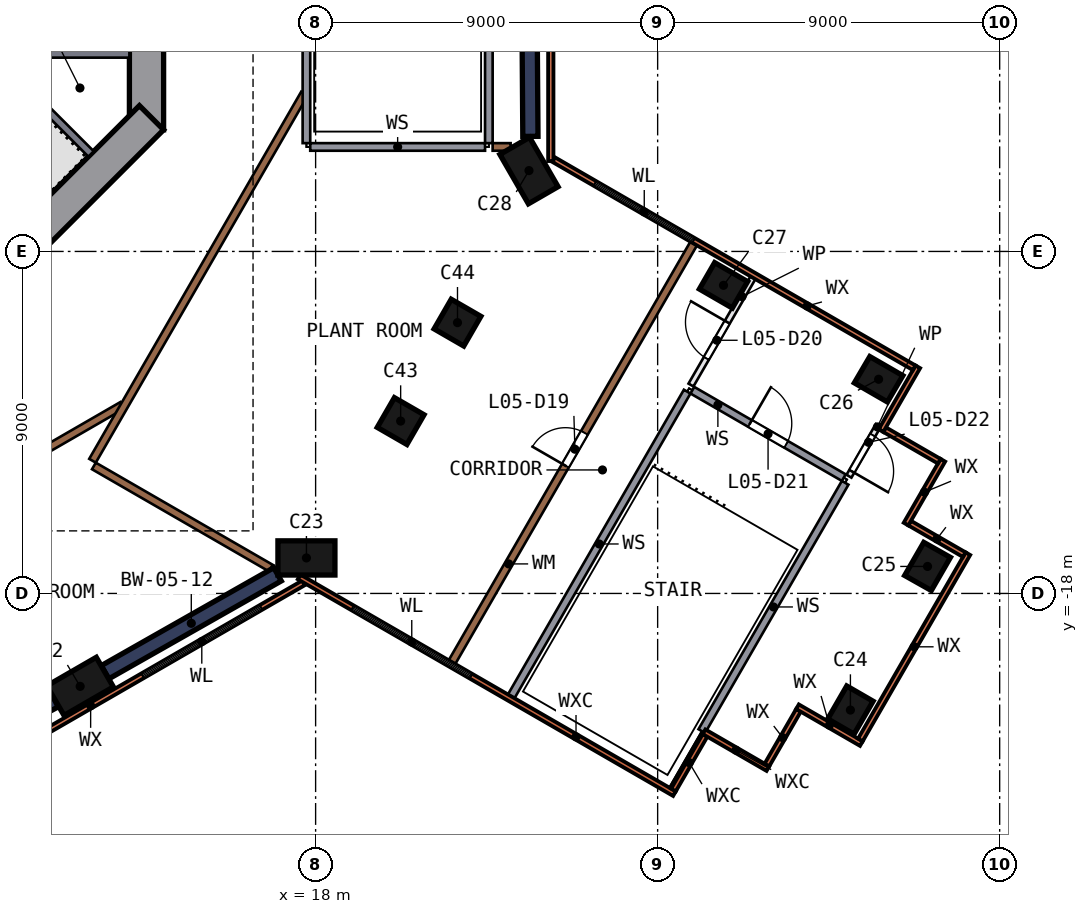
"""IFC4 building model, lengths in metres.
Left out: names, types, materials, properties, quantities, classifications, styles, units other than length and angle.
Written with IfcOpenShell. Run it as: python <this file> out.ifc"""

import sys

from ifc_helpers import new_model, si_unit, direction, frame, frame_2d, origin, origin_2d, place, context, subcontext, project, spatial, polyline, rectangle, outline, extrude, element, fill, save


model = new_model("IFC4")
c1 = context("Model", 3, precision=1e-05, world=origin(), true_north=direction((0.0, 1.0)))
c2 = subcontext(c1, "Body", "Model", "MODEL_VIEW")
j1 = project(units=[si_unit("LENGTHUNIT", "METRE"), si_unit("PLANEANGLEUNIT", "RADIAN")], contexts=[c1])
p1 = place(None, origin())
s1 = spatial("IfcSite", under=j1, at=p1, CompositionType="ELEMENT")
p2 = place(p1, origin())
s2 = spatial("IfcBuilding", under=s1, at=p2, CompositionType="ELEMENT")
p3 = place(p2, frame((0.0, 0.0, 28.0)))
s3 = spatial("IfcBuildingStorey", under=s2, at=p3, CompositionType="ELEMENT", Elevation=28.0)
for number, where, z_axis, x_axis in (
    (1, (11.804, -20.445, 0.0), (0.0, 0.0, 1.0), (0.866, 0.5, 0.0)),
    (2, (17.758, -17.065, 0.0), (0.0, 0.0, 1.0), (-1.0, 0.0, 0.0)),
):
    element("IfcColumn", number, at=place(p3, frame(where, z_axis=z_axis, x_axis=x_axis)), inside=s3, PredefinedType="COLUMN", context=c2, shape_type="SweptSolid", body=[
        extrude(rectangle(XDim=1.5, YDim=0.9, at=origin_2d()), origin(), (0.0, 0.0, 1.0), 4.5),
    ])
p4 = place(p3, frame((32.069, -21.055, 0.0), z_axis=(0.003037985, -0.011338195, 0.999931106), x_axis=(0.500048177, 0.865957813, 0.008299831)))
e3 = element("IfcColumn", 3, at=p4, inside=s3, PredefinedType="COLUMN", context=c2, shape_type="SweptSolid", body=[
    extrude(rectangle(XDim=1.0, YDim=0.8, at=origin_2d()), origin(), (0.0, 0.0, 1.0), 4.5),
])
p5 = place(p3, frame((34.269, -17.245, 0.0), z_axis=(-0.137474992, -0.036839002, 0.98981994), x_axis=(0.488630007, 0.866727232, 0.100123031)))
e4 = element("IfcColumn", 4, at=p5, inside=s3, PredefinedType="COLUMN", context=c2, shape_type="SweptSolid", body=[
    extrude(rectangle(XDim=1.0, YDim=0.8, at=origin_2d()), origin(), (0.0, 0.0, 1.0), 4.546),
])
p6 = place(p3, frame((32.951, -12.327, 0.0), z_axis=(-0.113094861, -0.030280758, 0.993122665), x_axis=(-0.859519435, 0.504400563, -0.082500986)))
e5 = element("IfcColumn", 5, at=p6, inside=s3, PredefinedType="COLUMN", context=c2, shape_type="SweptSolid", body=[
    extrude(rectangle(XDim=1.0, YDim=0.8, at=origin_2d()), origin(), (0.0, 0.0, 1.0), 4.531),
])
p7 = place(p3, frame((28.783, -9.805, 0.0), z_axis=(-0.041522613, -0.071961716, 0.996542716), x_axis=(-0.866153083, 0.499778788, 0.0)))
e6 = element("IfcColumn", 6, at=p7, inside=s3, PredefinedType="COLUMN", context=c2, shape_type="SweptSolid", body=[
    extrude(rectangle(XDim=1.0, YDim=0.8, at=origin_2d()), origin(), (0.0, 0.0, 1.0), 4.516),
])
p8 = place(p3, frame((23.658, -6.846, 0.0), z_axis=(-0.036588384, -0.021139955, 0.999106797), x_axis=(0.500277598, -0.865865073, 0.0)))
e7 = element("IfcColumn", 7, at=p8, inside=s3, PredefinedType="COLUMN", context=c2, shape_type="SweptSolid", body=[
    extrude(rectangle(XDim=1.5, YDim=0.9, at=origin_2d()), origin(), (0.0, 0.0, 1.0), 4.504),
])
p9 = place(p3, frame((20.283, -13.385, 0.0), z_axis=(-0.037868143, -0.06567418, 0.997122312), x_axis=(0.866304362, -0.499516518, 0.0)))
e8 = element("IfcColumn", 8, at=p9, inside=s3, PredefinedType="COLUMN", context=c2, shape_type="SweptSolid", body=[
    extrude(rectangle(XDim=0.9, YDim=0.9, at=origin_2d()), origin(), (0.0, 0.0, 1.0), 4.513),
])
p10 = place(p3, frame((21.733, -10.873, 0.0), z_axis=(0.0, 0.0, 1.0), x_axis=(0.866025404, -0.5, 0.0)))
e9 = element("IfcColumn", 9, at=p10, inside=s3, PredefinedType="COLUMN", context=c2, shape_type="SweptSolid", body=[
    extrude(rectangle(XDim=0.9, YDim=0.9, at=origin_2d()), origin(), (0.0, 0.0, 1.0), 4.5),
])
p11 = place(p3, frame((13.55, -5.799, 0.0), z_axis=(0.0, 0.0, 1.0), x_axis=(0.0, 1.0, 0.0)))
e10 = element("IfcWall", 10, at=p11, inside=s3, PredefinedType="SHEAR", context=c2, shape_type="SweptSolid", body=[
    extrude(rectangle(XDim=11.598, YDim=0.9, at=frame_2d((5.799, 0.0))), origin(), (0.0, 0.0, 1.0), 6.0),
])
p12 = place(p11, frame((4.899, 0.0, 0.0)))
e11 = element("IfcOpeningElement", 11, at=p12, cuts=e10, PredefinedType="OPENING", context=c2, shape_type="SweptSolid", body=[
    extrude(rectangle(XDim=1.8, YDim=2.1, at=frame_2d((0.9, 1.05))), frame((0.0, 0.46, 0.0), z_axis=(0.0, -1.0, 0.0), x_axis=(1.0, 0.0, 0.0)), (0.0, 0.0, 1.0), 0.92),
])
p13 = place(p3, frame((5.481, -13.682, 0.0), z_axis=(0.0, 0.0, 1.0), x_axis=(0.707106781, 0.707106781, 0.0)))
e12 = element("IfcWall", 12, at=p13, inside=s3, PredefinedType="SHEAR", context=c2, shape_type="SweptSolid", body=[
    extrude(rectangle(XDim=11.598, YDim=0.9, at=frame_2d((5.799, 0.0))), origin(), (0.0, 0.0, 1.0), 6.0),
])
p14 = place(p13, frame((2.099, 0.0, 0.0)))
e13 = element("IfcOpeningElement", 13, at=p14, cuts=e12, PredefinedType="OPENING", context=c2, shape_type="SweptSolid", body=[
    extrude(rectangle(XDim=1.2, YDim=2.1, at=frame_2d((0.6, 1.05))), frame((0.0, 0.46, 0.0), z_axis=(0.0, -1.0, 0.0), x_axis=(1.0, 0.0, 0.0)), (0.0, 0.0, 1.0), 0.92),
])
p15 = place(p3, frame((7.011, -23.032, 0.0), z_axis=(0.0, 0.0, 1.0), x_axis=(0.879988629, 0.474994751, 0.0)))
e14 = element("IfcWall", 14, at=p15, inside=s3, PredefinedType="SHEAR", context=c2, shape_type="SweptSolid", body=[
    extrude(rectangle(XDim=4.684, YDim=0.4, at=frame_2d((2.342, 0.0))), origin(), (0.0, 0.0, 1.0), 4.5),
])
p16 = place(p3, frame((12.459, -20.073, 0.0), z_axis=(0.0, 0.0, 1.0), x_axis=(0.869667461, 0.493638034, 0.0)))
e15 = element("IfcWall", 15, at=p16, inside=s3, PredefinedType="SHEAR", context=c2, shape_type="SweptSolid", body=[
    extrude(rectangle(XDim=5.219, YDim=0.4, at=frame_2d((2.609, 0.0))), origin(), (0.0, 0.0, 1.0), 4.5),
])
p17 = place(p3, frame((23.652, -5.972, 0.0), z_axis=(0.0, 0.0, 1.0), x_axis=(-0.00729771, 0.999973371, 0.0)))
e16 = element("IfcWall", 16, at=p17, inside=s3, PredefinedType="SHEAR", context=c2, shape_type="SweptSolid", body=[
    extrude(rectangle(XDim=5.219, YDim=0.4, at=frame_2d((2.609, 0.0))), origin(), (0.0, 0.0, 1.0), 4.5),
])
p18 = place(p3, frame((6.603, -24.118, 0.0), z_axis=(0.0, 0.0, 1.0), x_axis=(0.866023287, 0.500003667, 0.0)))
e17 = element("IfcWall", 17, at=p18, inside=s3, PredefinedType="SOLIDWALL", context=c2, shape_type="SweptSolid", body=[
    extrude(rectangle(XDim=12.801, YDim=0.14, at=frame_2d((6.4, 0.0))), origin(), (0.0, 0.0, 1.0), 4.5),
])
p19 = place(p18, frame((1.748, 0.0, 0.9)))
e18 = element("IfcOpeningElement", 18, at=p19, cuts=e17, PredefinedType="OPENING", context=c2, shape_type="SweptSolid", body=[
    extrude(rectangle(XDim=3.0, YDim=3.3, at=frame_2d((1.5, 1.65))), frame((0.0, 0.08, 0.0), z_axis=(0.0, -1.0, 0.0), x_axis=(1.0, 0.0, 0.0)), (0.0, 0.0, 1.0), 0.16),
])
p20 = place(p18, frame((7.902, 0.0, 0.9)))
e19 = element("IfcOpeningElement", 19, at=p20, cuts=e17, PredefinedType="OPENING", context=c2, shape_type="SweptSolid", body=[
    extrude(rectangle(XDim=3.6, YDim=3.3, at=frame_2d((1.8, 1.65))), frame((0.0, 0.08, 0.0), z_axis=(0.0, -1.0, 0.0), x_axis=(1.0, 0.0, 0.0)), (0.0, 0.0, 1.0), 0.16),
])
p21 = place(p3, frame((17.565, -17.566, 0.0), z_axis=(0.0, 0.0, 1.0), x_axis=(0.866028022, -0.499995465, 0.0)))
e20 = element("IfcWall", 20, at=p21, inside=s3, PredefinedType="SOLIDWALL", context=c2, shape_type="SweptSolid", body=[
    extrude(rectangle(XDim=11.405, YDim=0.14, at=frame_2d((5.702, 0.0))), origin(), (0.0, 0.0, 1.0), 4.5),
])
p22 = place(p21, frame((1.623, 0.0, 0.9)))
e21 = element("IfcOpeningElement", 21, at=p22, cuts=e20, PredefinedType="OPENING", context=c2, shape_type="SweptSolid", body=[
    extrude(rectangle(XDim=3.6, YDim=3.3, at=frame_2d((1.8, 1.65))), frame((0.0, 0.08, 0.0), z_axis=(0.0, -1.0, 0.0), x_axis=(1.0, 0.0, 0.0)), (0.0, 0.0, 1.0), 0.16),
])
p23 = place(p3, frame((27.417, -23.173, 0.0), z_axis=(0.0, 0.0, 1.0), x_axis=(0.499951638, 0.866053324, 0.0)))
e22 = element("IfcWall", 22, at=p23, inside=s3, PredefinedType="SOLIDWALL", context=c2, shape_type="SweptSolid", body=[
    extrude(rectangle(XDim=1.66, YDim=0.14, at=frame_2d((0.83, 0.0))), origin(), (0.0, 0.0, 1.0), 4.5),
])
p24 = place(p3, frame((28.221, -21.64, 0.0), z_axis=(0.0, 0.0, 1.0), x_axis=(0.866011627, -0.500023862, 0.0)))
e23 = element("IfcWall", 23, at=p24, inside=s3, PredefinedType="SOLIDWALL", context=c2, shape_type="SweptSolid", body=[
    extrude(rectangle(XDim=1.94, YDim=0.14, at=frame_2d((0.97, 0.0))), origin(), (0.0, 0.0, 1.0), 4.5),
])
p25 = place(p3, frame((29.875, -22.514, 0.0), z_axis=(0.0, 0.0, 1.0), x_axis=(0.499998264, 0.866026406, 0.0)))
e24 = element("IfcWall", 24, at=p25, inside=s3, PredefinedType="SOLIDWALL", context=c2, shape_type="SweptSolid", body=[
    extrude(rectangle(XDim=1.66, YDim=0.14, at=frame_2d((0.83, 0.0))), origin(), (0.0, 0.0, 1.0), 4.5),
])
p26 = place(p3, frame((30.68, -20.981, 0.0), z_axis=(0.0, 0.0, 1.0), x_axis=(0.866043088, -0.499969368, 0.0)))
e25 = element("IfcWall", 25, at=p26, inside=s3, PredefinedType="SOLIDWALL", context=c2, shape_type="SweptSolid", body=[
    extrude(rectangle(XDim=1.94, YDim=0.14, at=frame_2d((0.97, 0.0))), origin(), (0.0, 0.0, 1.0), 4.5),
])
p27 = place(p3, frame((32.334, -21.855, 0.0), z_axis=(0.0, 0.0, 1.0), x_axis=(0.499985074, 0.866034021, 0.0)))
e26 = element("IfcWall", 26, at=p27, inside=s3, PredefinedType="SOLIDWALL", context=c2, shape_type="SweptSolid", body=[
    extrude(rectangle(XDim=5.66, YDim=0.14, at=frame_2d((2.83, 0.0))), origin(), (0.0, 0.0, 1.0), 4.5),
])
p28 = place(p3, frame((35.069, -16.979, 0.0), z_axis=(0.0, 0.0, 1.0), x_axis=(-0.866053324, 0.499951638, 0.0)))
e27 = element("IfcWall", 27, at=p28, inside=s3, PredefinedType="SOLIDWALL", context=c2, shape_type="SweptSolid", body=[
    extrude(rectangle(XDim=1.66, YDim=0.14, at=frame_2d((0.83, 0.0))), origin(), (0.0, 0.0, 1.0), 4.5),
])
p29 = place(p3, frame((33.535, -16.175, 0.0), z_axis=(0.0, 0.0, 1.0), x_axis=(0.500063744, 0.865988598, 0.0)))
e28 = element("IfcWall", 28, at=p29, inside=s3, PredefinedType="SOLIDWALL", context=c2, shape_type="SweptSolid", body=[
    extrude(rectangle(XDim=1.94, YDim=0.14, at=frame_2d((0.97, 0.0))), origin(), (0.0, 0.0, 1.0), 4.5),
])
p30 = place(p3, frame((34.41, -14.52, 0.0), z_axis=(0.0, 0.0, 1.0), x_axis=(-0.865989634, 0.500061949, 0.0)))
e29 = element("IfcWall", 29, at=p30, inside=s3, PredefinedType="SOLIDWALL", context=c2, shape_type="SweptSolid", body=[
    extrude(rectangle(XDim=1.66, YDim=0.14, at=frame_2d((0.83, 0.0))), origin(), (0.0, 0.0, 1.0), 4.5),
])
p31 = place(p3, frame((32.877, -13.716, 0.0), z_axis=(0.0, 0.0, 1.0), x_axis=(0.500023862, 0.866011627, 0.0)))
e30 = element("IfcWall", 30, at=p31, inside=s3, PredefinedType="SOLIDWALL", context=c2, shape_type="SweptSolid", body=[
    extrude(rectangle(XDim=1.94, YDim=0.14, at=frame_2d((0.97, 0.0))), origin(), (0.0, 0.0, 1.0), 4.5),
])
p32 = place(p3, frame((33.751, -12.062, 0.0), z_axis=(0.0, 0.0, 1.0), x_axis=(-0.86602647, 0.499998154, 0.0)))
e31 = element("IfcWall", 31, at=p32, inside=s3, PredefinedType="SOLIDWALL", context=c2, shape_type="SweptSolid", body=[
    extrude(rectangle(XDim=10.961, YDim=0.14, at=frame_2d((5.481, 0.0))), origin(), (0.0, 0.0, 1.0), 4.5),
])
p33 = place(p32, frame((6.702, 0.0, 0.9)))
e32 = element("IfcOpeningElement", 32, at=p33, cuts=e31, PredefinedType="OPENING", context=c2, shape_type="SweptSolid", body=[
    extrude(rectangle(XDim=3.0, YDim=3.3, at=frame_2d((1.5, 1.65))), frame((0.0, 0.08, 0.0), z_axis=(0.0, -1.0, 0.0), x_axis=(1.0, 0.0, 0.0)), (0.0, 0.0, 1.0), 0.16),
])
p34 = place(p3, frame((24.188, -6.621, 0.0), z_axis=(0.0, 0.0, 1.0), x_axis=(0.0, 1.0, 0.0)))
e33 = element("IfcWall", 33, at=p34, inside=s3, PredefinedType="SOLIDWALL", context=c2, shape_type="SweptSolid", body=[
    extrude(rectangle(XDim=13.242, YDim=0.14, at=frame_2d((6.621, 0.0))), origin(), (0.0, 0.0, 1.0), 4.5),
])
p35 = place(p3, origin())
e34 = element("IfcWall", 34, at=p35, inside=s3, PredefinedType="SOLIDWALL", context=c2, shape_type="SweptSolid", body=[
    extrude(outline(polyline([(13.1, -1.2), (13.1, -3.9), (10.7, -3.9), (10.7, -1.2), (13.1, -1.2)]), holes=[polyline([(10.9, -3.7), (12.9, -3.7), (12.9, -1.4), (10.9, -1.4), (10.9, -3.7)])]), origin(), (0.0, 0.0, 1.0), 5.55),
])
p36 = place(p3, frame((9.334, -3.677, 0.0), z_axis=(0.0, 0.0, 1.0), x_axis=(0.707106781, -0.707106781, 0.0)))
e35 = element("IfcWall", 35, at=p36, inside=s3, PredefinedType="SOLIDWALL", context=c2, shape_type="SweptSolid", body=[
    extrude(rectangle(XDim=3.9, YDim=0.2, at=frame_2d((1.95, 0.0))), origin(), (0.0, 0.0, 1.0), 5.55),
])
p37 = place(p3, frame((12.166, -14.645, 0.0), z_axis=(0.0, 0.0, 1.0), x_axis=(0.866004064, -0.50003696, 0.0)))
e36 = element("IfcWall", 36, at=p37, inside=s3, PredefinedType="SOLIDWALL", context=c2, shape_type="SweptSolid", body=[
    extrude(rectangle(XDim=5.375, YDim=0.2, at=frame_2d((2.688, 0.0))), origin(), (0.0, 0.0, 1.0), 4.5),
])
p38 = place(p3, frame((12.913, -13.05, 0.0), z_axis=(0.0, 0.0, 1.0), x_axis=(-0.866031025, -0.499990264, 0.0)))
e37 = element("IfcWall", 37, at=p38, inside=s3, PredefinedType="SOLIDWALL", context=c2, shape_type="SweptSolid", body=[
    extrude(rectangle(XDim=9.075, YDim=0.2, at=frame_2d((4.538, 0.0))), origin(), (0.0, 0.0, 1.0), 4.5),
])
p39 = place(p38, frame((3.95, 0.0, 0.0)))
e38 = element("IfcOpeningElement", 38, at=p39, cuts=e37, PredefinedType="OPENING", context=c2, shape_type="SweptSolid", body=[
    extrude(rectangle(XDim=1.0, YDim=2.1, at=frame_2d((0.5, 1.05))), frame((0.0, 0.11, 0.0), z_axis=(0.0, -1.0, 0.0), x_axis=(1.0, 0.0, 0.0)), (0.0, 0.0, 1.0), 0.22),
])
p40 = place(p3, frame((17.858, -6.25, 0.0), z_axis=(0.0, 0.0, 1.0), x_axis=(1.0, 0.0, 0.0)))
e39 = element("IfcWall", 39, at=p40, inside=s3, PredefinedType="SOLIDWALL", context=c2, shape_type="SweptSolid", body=[
    extrude(rectangle(XDim=4.6, YDim=0.2, at=frame_2d((2.3, 0.0))), origin(), (0.0, 0.0, 1.0), 4.5),
])
p41 = place(p3, frame((17.708, -4.845, 0.0), z_axis=(0.0, 0.0, 1.0), x_axis=(-0.499998343, -0.866026361, 0.0)))
e40 = element("IfcWall", 40, at=p41, inside=s3, PredefinedType="SOLIDWALL", context=c2, shape_type="SweptSolid", body=[
    extrude(rectangle(XDim=11.158, YDim=0.2, at=frame_2d((5.579, 0.0))), origin(), (0.0, 0.0, 1.0), 4.5),
])
p42 = place(p3, frame((17.758, 3.15, 0.0), z_axis=(0.0, 0.0, 1.0), x_axis=(0.0, -1.0, 0.0)))
e41 = element("IfcWall", 41, at=p42, inside=s3, PredefinedType="SOLIDWALL", context=c2, shape_type="SweptSolid", body=[
    extrude(rectangle(XDim=9.3, YDim=0.2, at=frame_2d((4.65, 0.0))), origin(), (0.0, 0.0, 1.0), 4.5),
])
p43 = place(p3, frame((22.558, -6.15, 0.0), z_axis=(0.0, 0.0, 1.0), x_axis=(0.0, 1.0, 0.0)))
e42 = element("IfcWall", 42, at=p43, inside=s3, PredefinedType="SOLIDWALL", context=c2, shape_type="SweptSolid", body=[
    extrude(rectangle(XDim=9.5, YDim=0.2, at=frame_2d((4.75, 0.0))), origin(), (0.0, 0.0, 1.0), 4.5),
])
p44 = place(p3, frame((22.658, -6.25, 0.0), z_axis=(0.0, 0.0, 1.0), x_axis=(1.0, 0.0, 0.0)))
e43 = element("IfcWall", 43, at=p44, inside=s3, PredefinedType="SOLIDWALL", context=c2, shape_type="SweptSolid", body=[
    extrude(rectangle(XDim=0.473, YDim=0.2, at=frame_2d((0.237, 0.0))), origin(), (0.0, 0.0, 1.0), 4.5),
])
p45 = place(p3, frame((28.162, -21.623, 0.0), z_axis=(0.0, 0.0, 1.0), x_axis=(0.499981072, 0.866036332, 0.0)))
e44 = element("IfcWall", 44, at=p45, inside=s3, PredefinedType="SOLIDWALL", context=c2, shape_type="SweptSolid", body=[
    extrude(rectangle(XDim=7.545, YDim=0.2, at=frame_2d((3.772, 0.0))), origin(), (0.0, 0.0, 1.0), 4.5),
])
p46 = place(p3, frame((27.777, -12.688, 0.0), z_axis=(0.0, 0.0, 1.0), x_axis=(-0.500003922, -0.866023139, 0.0)))
e45 = element("IfcWall", 45, at=p46, inside=s3, PredefinedType="SOLIDWALL", context=c2, shape_type="SweptSolid", body=[
    extrude(rectangle(XDim=9.26, YDim=0.2, at=frame_2d((4.63, 0.0))), origin(), (0.0, 0.0, 1.0), 4.5),
])
p47 = place(p3, frame((21.588, -19.808, 0.0), z_axis=(0.0, 0.0, 1.0), x_axis=(0.499991053, 0.866030569, 0.0)))
e46 = element("IfcWall", 46, at=p47, inside=s3, PredefinedType="SOLIDWALL", context=c2, shape_type="SweptSolid", body=[
    extrude(rectangle(XDim=12.72, YDim=0.2, at=frame_2d((6.36, 0.0))), origin(), (0.0, 0.0, 1.0), 4.5),
])
p48 = place(p47, frame((5.97, 0.0, 0.0)))
e47 = element("IfcOpeningElement", 47, at=p48, cuts=e46, PredefinedType="OPENING", context=c2, shape_type="SweptSolid", body=[
    extrude(rectangle(XDim=1.0, YDim=2.1, at=frame_2d((0.5, 1.05))), frame((0.0, 0.11, 0.0), z_axis=(0.0, -1.0, 0.0), x_axis=(1.0, 0.0, 0.0)), (0.0, 0.0, 1.0), 0.22),
])
p49 = place(p3, frame((27.877, -12.515, 0.0), z_axis=(0.0, 0.0, 1.0), x_axis=(0.499973122, 0.866040921, 0.0)))
e48 = element("IfcWall", 48, at=p49, inside=s3, PredefinedType="PARTITIONING", context=c2, shape_type="SweptSolid", body=[
    extrude(rectangle(XDim=3.26, YDim=0.15, at=frame_2d((1.63, 0.0))), origin(), (0.0, 0.0, 1.0), 4.5),
])
p50 = place(p49, frame((0.81, 0.0, 0.0)))
e49 = element("IfcOpeningElement", 49, at=p50, cuts=e48, PredefinedType="OPENING", context=c2, shape_type="SweptSolid", body=[
    extrude(rectangle(XDim=1.1, YDim=2.1, at=frame_2d((0.55, 1.05))), frame((0.0, 0.085, 0.0), z_axis=(0.0, -1.0, 0.0), x_axis=(1.0, 0.0, 0.0)), (0.0, 0.0, 1.0), 0.17),
])
p51 = place(p3, frame((27.914, -12.652, 0.0), z_axis=(0.0, 0.0, 1.0), x_axis=(0.86601677, -0.500014953, 0.0)))
e50 = element("IfcWall", 50, at=p51, inside=s3, PredefinedType="SOLIDWALL", context=c2, shape_type="SweptSolid", body=[
    extrude(rectangle(XDim=4.6, YDim=0.2, at=frame_2d((2.3, 0.0))), origin(), (0.0, 0.0, 1.0), 4.5),
])
p52 = place(p51, frame((1.75, 0.0, 0.0)))
e51 = element("IfcOpeningElement", 51, at=p52, cuts=e50, PredefinedType="OPENING", context=c2, shape_type="SweptSolid", body=[
    extrude(rectangle(XDim=1.1, YDim=2.1, at=frame_2d((0.55, 1.05))), frame((0.0, 0.11, 0.0), z_axis=(0.0, -1.0, 0.0), x_axis=(1.0, 0.0, 0.0)), (0.0, 0.0, 1.0), 0.22),
])
p53 = place(p3, frame((32.807, -13.577, 0.0), z_axis=(0.0, 0.0, 1.0), x_axis=(-0.499995951, -0.866027742, 0.0)))
e52 = element("IfcWall", 52, at=p53, inside=s3, PredefinedType="PARTITIONING", context=c2, shape_type="SweptSolid", body=[
    extrude(rectangle(XDim=1.545, YDim=0.15, at=frame_2d((0.773, 0.0))), origin(), (0.0, 0.0, 1.0), 4.5),
])
p54 = place(p53, frame((0.295, 0.0, 0.0)))
e53 = element("IfcOpeningElement", 53, at=p54, cuts=e52, PredefinedType="OPENING", context=c2, shape_type="SweptSolid", body=[
    extrude(rectangle(XDim=1.1, YDim=2.1, at=frame_2d((0.55, 1.05))), frame((0.0, 0.085, 0.0), z_axis=(0.0, -1.0, 0.0), x_axis=(1.0, 0.0, 0.0)), (0.0, 0.0, 1.0), 0.17),
])
p55 = place(p20, origin())
e54 = element("IfcWindow", 54, at=p55, inside=s3, PartitioningType="SINGLE_PANEL", PredefinedType="WINDOW", context=c2, shape_type="SweptSolid", body=[
    extrude(rectangle(XDim=3.6, YDim=3.3, at=frame_2d((1.8, 1.65))), frame((0.0, 0.03, 0.0), z_axis=(0.0, -1.0, 0.0), x_axis=(1.0, 0.0, 0.0)), (0.0, 0.0, 1.0), 0.06),
])
fill(e19, e54)
p56 = place(p22, origin())
e55 = element("IfcWindow", 55, at=p56, inside=s3, PartitioningType="SINGLE_PANEL", PredefinedType="WINDOW", context=c2, shape_type="SweptSolid", body=[
    extrude(rectangle(XDim=3.6, YDim=3.3, at=frame_2d((1.8, 1.65))), frame((0.0, 0.03, 0.0), z_axis=(0.0, -1.0, 0.0), x_axis=(1.0, 0.0, 0.0)), (0.0, 0.0, 1.0), 0.06),
])
fill(e21, e55)
p57 = place(p33, origin())
e56 = element("IfcWindow", 56, at=p57, inside=s3, PartitioningType="SINGLE_PANEL", PredefinedType="WINDOW", context=c2, shape_type="SweptSolid", body=[
    extrude(rectangle(XDim=3.0, YDim=3.3, at=frame_2d((1.5, 1.65))), frame((0.0, 0.03, 0.0), z_axis=(0.0, -1.0, 0.0), x_axis=(1.0, 0.0, 0.0)), (0.0, 0.0, 1.0), 0.06),
])
fill(e32, e56)
p58 = place(p48, origin())
e57 = element("IfcDoor", 57, at=p58, inside=s3, OperationType="SINGLE_SWING_LEFT", PredefinedType="DOOR", context=c2, shape_type="SweptSolid", body=[
    extrude(rectangle(XDim=1.0, YDim=2.1, at=frame_2d((0.5, 1.05))), frame((0.0, 0.025, 0.0), z_axis=(0.0, -1.0, 0.0), x_axis=(1.0, 0.0, 0.0)), (0.0, 0.0, 1.0), 0.05),
])
fill(e47, e57)
p59 = place(p50, origin())
e58 = element("IfcDoor", 58, at=p59, inside=s3, OperationType="SINGLE_SWING_RIGHT", PredefinedType="DOOR", context=c2, shape_type="SweptSolid", body=[
    extrude(rectangle(XDim=1.1, YDim=2.1, at=frame_2d((0.55, 1.05))), frame((0.0, 0.025, 0.0), z_axis=(0.0, -1.0, 0.0), x_axis=(1.0, 0.0, 0.0)), (0.0, 0.0, 1.0), 0.05),
])
fill(e49, e58)
p60 = place(p52, origin())
e59 = element("IfcDoor", 59, at=p60, inside=s3, OperationType="SINGLE_SWING_LEFT", PredefinedType="DOOR", context=c2, shape_type="SweptSolid", body=[
    extrude(rectangle(XDim=1.1, YDim=2.1, at=frame_2d((0.55, 1.05))), frame((0.0, 0.025, 0.0), z_axis=(0.0, -1.0, 0.0), x_axis=(1.0, 0.0, 0.0)), (0.0, 0.0, 1.0), 0.05),
])
fill(e51, e59)
p61 = place(p54, origin())
e60 = element("IfcDoor", 60, at=p61, inside=s3, OperationType="SINGLE_SWING_RIGHT", PredefinedType="DOOR", context=c2, shape_type="SweptSolid", body=[
    extrude(rectangle(XDim=1.1, YDim=2.1, at=frame_2d((0.55, 1.05))), frame((0.0, 0.025, 0.0), z_axis=(0.0, -1.0, 0.0), x_axis=(1.0, 0.0, 0.0)), (0.0, 0.0, 1.0), 0.05),
])
fill(e53, e60)
save(model, sys.argv[1])
